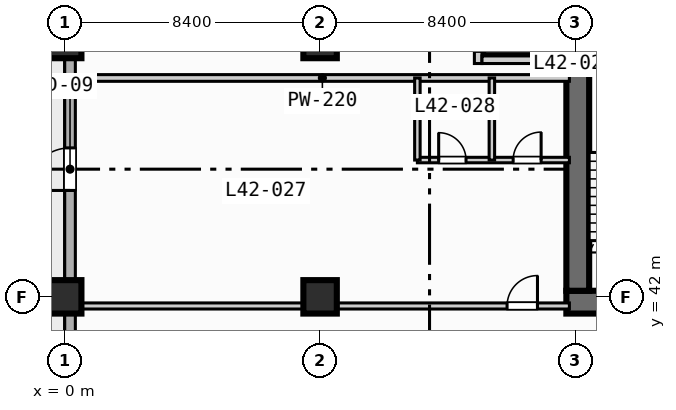
"""IFC4 building model, lengths in metres.
Left out: names, types, materials, properties, quantities, classifications, styles, units other than length and angle.
Written with IfcOpenShell. Run it as: python <this file> out.ifc"""

import sys

from ifc_helpers import new_model, si_unit, direction, frame, frame_2d, origin, origin_2d, place, context, subcontext, project, spatial, rectangle, extrude, element, fill, save


model = new_model("IFC4")
c1 = context("Model", 3, precision=1e-05, world=origin(), true_north=direction((0.0, 1.0)))
c2 = subcontext(c1, "Body", "Model", "MODEL_VIEW")
j1 = project(units=[si_unit("LENGTHUNIT", "METRE"), si_unit("PLANEANGLEUNIT", "RADIAN")], contexts=[c1])
p1 = place(None, origin())
s1 = spatial("IfcSite", under=j1, at=p1, CompositionType="ELEMENT")
p2 = place(p1, origin())
s2 = spatial("IfcBuilding", under=s1, at=p2, CompositionType="ELEMENT")
p3 = place(p2, frame((0.0, 0.0, 175.4)))
s3 = spatial("IfcBuildingStorey", under=s2, at=p3, CompositionType="ELEMENT", Elevation=175.4)
p4 = place(p3, frame((16.5, 41.825, 0.0), z_axis=(0.0, 0.0, 1.0), x_axis=(1.0, 0.0, 0.0)))
e1 = element("IfcWall", 1, at=p4, inside=s3, PredefinedType="SHEAR", context=c2, shape_type="SweptSolid", body=[
    extrude(rectangle(XDim=1.5, YDim=0.75, at=frame_2d((0.75, 0.0))), origin(), (0.0, 0.0, 1.0), 3.47),
])
p5 = place(p3, frame((16.875, 42.2, 0.0), z_axis=(0.0, 0.0, 1.0), x_axis=(0.0, 1.0, 0.0)))
e2 = element("IfcWall", 2, at=p5, inside=s3, PredefinedType="SHEAR", context=c2, shape_type="SweptSolid", body=[
    extrude(rectangle(XDim=16.35, YDim=0.75, at=frame_2d((8.175, 0.0))), origin(), (0.0, 0.0, 1.0), 3.47),
])
for number, where, z_axis, x_axis in (
    (3, (0.0, 42.0, 0.0), (0.0, 0.0, 1.0), (1.0, 0.0, 0.0)),
    (4, (0.0, 50.4, 0.0), (0.0, 0.0, 1.0), (1.0, 0.0, 0.0)),
    (5, (8.4, 42.0, 0.0), (0.0, 0.0, 1.0), (1.0, 0.0, 0.0)),
    (6, (8.4, 50.4, 0.0), (0.0, 0.0, 1.0), (1.0, 0.0, 0.0)),
):
    element("IfcColumn", number, at=place(p3, frame(where, z_axis=z_axis, x_axis=x_axis)), inside=s3, PredefinedType="COLUMN", context=c2, shape_type="SweptSolid", body=[
        extrude(rectangle(XDim=1.1, YDim=1.1, at=origin_2d()), origin(), (0.0, 0.0, 1.0), 3.7),
    ])
p6 = place(p3, frame((0.175, 3.175, 0.0), z_axis=(0.0, 0.0, 1.0), x_axis=(0.0, 1.0, 0.0)))
e7 = element("IfcWall", 7, at=p6, inside=s3, PredefinedType="STANDARD", context=c2, shape_type="SweptSolid", body=[
    extrude(rectangle(XDim=69.25, YDim=0.35, at=frame_2d((34.625, 0.0))), origin(), (0.0, 0.0, 1.0), 3.47),
])
p7 = place(p6, frame((42.325, 0.0, 0.0)))
e8 = element("IfcOpeningElement", 8, at=p7, cuts=e7, PredefinedType="OPENING", context=c2, shape_type="SweptSolid", body=[
    extrude(rectangle(XDim=1.4, YDim=2.2, at=frame_2d((0.7, 1.1))), frame((0.0, 0.185, 0.0), z_axis=(0.0, -1.0, 0.0), x_axis=(1.0, 0.0, 0.0)), (0.0, 0.0, 1.0), 0.37),
])
p8 = place(p6, frame((25.025, 0.0, 0.85)))
e9 = element("IfcOpeningElement", 9, at=p8, cuts=e7, PredefinedType="OPENING", context=c2, shape_type="SweptSolid", body=[
    extrude(rectangle(XDim=2.4, YDim=1.95, at=frame_2d((1.2, 0.975))), frame((0.0, 0.185, 0.0), z_axis=(0.0, -1.0, 0.0), x_axis=(1.0, 0.0, 0.0)), (0.0, 0.0, 1.0), 0.37),
])
p9 = place(p6, frame((33.725, 0.0, 0.85)))
e10 = element("IfcOpeningElement", 10, at=p9, cuts=e7, PredefinedType="OPENING", context=c2, shape_type="SweptSolid", body=[
    extrude(rectangle(XDim=1.8, YDim=1.8, at=frame_2d((0.9, 0.9))), frame((0.0, 0.185, 0.0), z_axis=(0.0, -1.0, 0.0), x_axis=(1.0, 0.0, 0.0)), (0.0, 0.0, 1.0), 0.37),
])
p10 = place(p6, frame((58.625, 0.0, 0.85)))
e11 = element("IfcOpeningElement", 11, at=p10, cuts=e7, PredefinedType="OPENING", context=c2, shape_type="SweptSolid", body=[
    extrude(rectangle(XDim=2.4, YDim=1.95, at=frame_2d((1.2, 0.975))), frame((0.0, 0.185, 0.0), z_axis=(0.0, -1.0, 0.0), x_axis=(1.0, 0.0, 0.0)), (0.0, 0.0, 1.0), 0.37),
])
p11 = place(p3, frame((13.6, 49.675, 0.0), z_axis=(0.0, 0.0, 1.0), x_axis=(0.0, 1.0, 0.0)))
e12 = element("IfcWall", 12, at=p11, inside=s3, PredefinedType="SOLIDWALL", context=c2, shape_type="SweptSolid", body=[
    extrude(rectangle(XDim=2.75, YDim=0.25, at=frame_2d((1.375, 0.0))), origin(), (0.0, 0.0, 1.0), 3.47),
])
p12 = place(p11, frame((0.4, 0.0, 0.0)))
e13 = element("IfcOpeningElement", 13, at=p12, cuts=e12, PredefinedType="OPENING", context=c2, shape_type="SweptSolid", body=[
    extrude(rectangle(XDim=1.1, YDim=2.15, at=frame_2d((0.55, 1.075))), frame((0.0, 0.135, 0.0), z_axis=(0.0, -1.0, 0.0), x_axis=(1.0, 0.0, 0.0)), (0.0, 0.0, 1.0), 0.27),
])
p13 = place(p3, frame((15.6, 49.675, 0.0), z_axis=(0.0, 0.0, 1.0), x_axis=(0.0, 1.0, 0.0)))
e14 = element("IfcWall", 14, at=p13, inside=s3, PredefinedType="SOLIDWALL", context=c2, shape_type="SweptSolid", body=[
    extrude(rectangle(XDim=2.75, YDim=0.25, at=frame_2d((1.375, 0.0))), origin(), (0.0, 0.0, 1.0), 3.47),
])
p14 = place(p3, frame((13.725, 49.8, 0.0), z_axis=(0.0, 0.0, 1.0), x_axis=(1.0, 0.0, 0.0)))
e15 = element("IfcWall", 15, at=p14, inside=s3, PredefinedType="SOLIDWALL", context=c2, shape_type="SweptSolid", body=[
    extrude(rectangle(XDim=1.75, YDim=0.25, at=frame_2d((0.875, 0.0))), origin(), (0.0, 0.0, 1.0), 3.47),
])
p15 = place(p3, frame((0.35, 41.7, 0.0), z_axis=(0.0, 0.0, 1.0), x_axis=(1.0, 0.0, 0.0)))
e16 = element("IfcWall", 16, at=p15, inside=s3, PredefinedType="PARTITIONING", context=c2, shape_type="SweptSolid", body=[
    extrude(rectangle(XDim=16.25, YDim=0.2, at=frame_2d((8.125, 0.0))), origin(), (0.0, 0.0, 1.0), 2.82),
])
p16 = place(p15, frame((14.2, 0.0, 0.0)))
e17 = element("IfcOpeningElement", 17, at=p16, cuts=e16, PredefinedType="OPENING", context=c2, shape_type="SweptSolid", body=[
    extrude(rectangle(XDim=1.0, YDim=2.15, at=frame_2d((0.5, 1.075))), frame((0.0, 0.11, 0.0), z_axis=(0.0, -1.0, 0.0), x_axis=(1.0, 0.0, 0.0)), (0.0, 0.0, 1.0), 0.22),
])
p17 = place(p3, frame((0.35, 49.2, 0.0), z_axis=(0.0, 0.0, 1.0), x_axis=(1.0, 0.0, 0.0)))
e18 = element("IfcWall", 18, at=p17, inside=s3, PredefinedType="PARTITIONING", context=c2, shape_type="SweptSolid", body=[
    extrude(rectangle(XDim=16.25, YDim=0.22, at=frame_2d((8.125, 0.0))), origin(), (0.0, 0.0, 1.0), 3.47),
])
p18 = place(p3, frame((11.6, 46.5, 0.0), z_axis=(0.0, 0.0, 1.0), x_axis=(1.0, 0.0, 0.0)))
e19 = element("IfcWall", 19, at=p18, inside=s3, PredefinedType="PLUMBINGWALL", context=c2, shape_type="SweptSolid", body=[
    extrude(rectangle(XDim=5.0, YDim=0.18, at=frame_2d((2.5, 0.0))), origin(), (0.0, 0.0, 1.0), 3.47),
])
p19 = place(p18, frame((0.7, 0.0, 0.0)))
e20 = element("IfcOpeningElement", 20, at=p19, cuts=e19, PredefinedType="OPENING", context=c2, shape_type="SweptSolid", body=[
    extrude(rectangle(XDim=0.9, YDim=2.1, at=frame_2d((0.45, 1.05))), frame((0.0, 0.1, 0.0), z_axis=(0.0, -1.0, 0.0), x_axis=(1.0, 0.0, 0.0)), (0.0, 0.0, 1.0), 0.2),
])
p20 = place(p18, frame((3.15, 0.0, 0.0)))
e21 = element("IfcOpeningElement", 21, at=p20, cuts=e19, PredefinedType="OPENING", context=c2, shape_type="SweptSolid", body=[
    extrude(rectangle(XDim=0.92, YDim=2.1, at=frame_2d((0.46, 1.05))), frame((0.0, 0.1, 0.0), z_axis=(0.0, -1.0, 0.0), x_axis=(1.0, 0.0, 0.0)), (0.0, 0.0, 1.0), 0.2),
])
for number, where, z_axis, x_axis in (
    (22, (11.6, 46.5, 0.0), (0.0, 0.0, 1.0), (0.0, 1.0, 0.0)),
    (23, (14.05, 46.5, 0.0), (0.0, 0.0, 1.0), (0.0, 1.0, 0.0)),
):
    element("IfcWall", number, at=place(p3, frame(where, z_axis=z_axis, x_axis=x_axis)), inside=s3, PredefinedType="PLUMBINGWALL", context=c2, shape_type="SweptSolid", body=[
        extrude(rectangle(XDim=2.7, YDim=0.18, at=frame_2d((1.35, 0.0))), origin(), (0.0, 0.0, 1.0), 3.47),
    ])
p21 = place(p7, origin())
e24 = element("IfcDoor", 24, at=p21, inside=s3, OperationType="SINGLE_SWING_LEFT", PredefinedType="DOOR", context=c2, shape_type="SweptSolid", body=[
    extrude(rectangle(XDim=1.4, YDim=2.2, at=frame_2d((0.7, 1.1))), frame((0.0, 0.025, 0.0), z_axis=(0.0, -1.0, 0.0), x_axis=(1.0, 0.0, 0.0)), (0.0, 0.0, 1.0), 0.05),
])
fill(e8, e24)
p22 = place(p16, origin())
e25 = element("IfcDoor", 25, at=p22, inside=s3, OperationType="SINGLE_SWING_RIGHT", PredefinedType="DOOR", context=c2, shape_type="SweptSolid", body=[
    extrude(rectangle(XDim=1.0, YDim=2.15, at=frame_2d((0.5, 1.075))), frame((0.0, 0.025, 0.0), z_axis=(0.0, -1.0, 0.0), x_axis=(1.0, 0.0, 0.0)), (0.0, 0.0, 1.0), 0.05),
])
fill(e17, e25)
p23 = place(p19, origin())
e26 = element("IfcDoor", 26, at=p23, inside=s3, OperationType="SINGLE_SWING_LEFT", PredefinedType="DOOR", context=c2, shape_type="SweptSolid", body=[
    extrude(rectangle(XDim=0.9, YDim=2.1, at=frame_2d((0.45, 1.05))), frame((0.0, 0.025, 0.0), z_axis=(0.0, -1.0, 0.0), x_axis=(1.0, 0.0, 0.0)), (0.0, 0.0, 1.0), 0.05),
])
fill(e20, e26)
p24 = place(p20, origin())
e27 = element("IfcDoor", 27, at=p24, inside=s3, OperationType="SINGLE_SWING_RIGHT", PredefinedType="DOOR", context=c2, shape_type="SweptSolid", body=[
    extrude(rectangle(XDim=0.92, YDim=2.1, at=frame_2d((0.46, 1.05))), frame((0.0, 0.025, 0.0), z_axis=(0.0, -1.0, 0.0), x_axis=(1.0, 0.0, 0.0)), (0.0, 0.0, 1.0), 0.05),
])
fill(e21, e27)
save(model, sys.argv[1])
